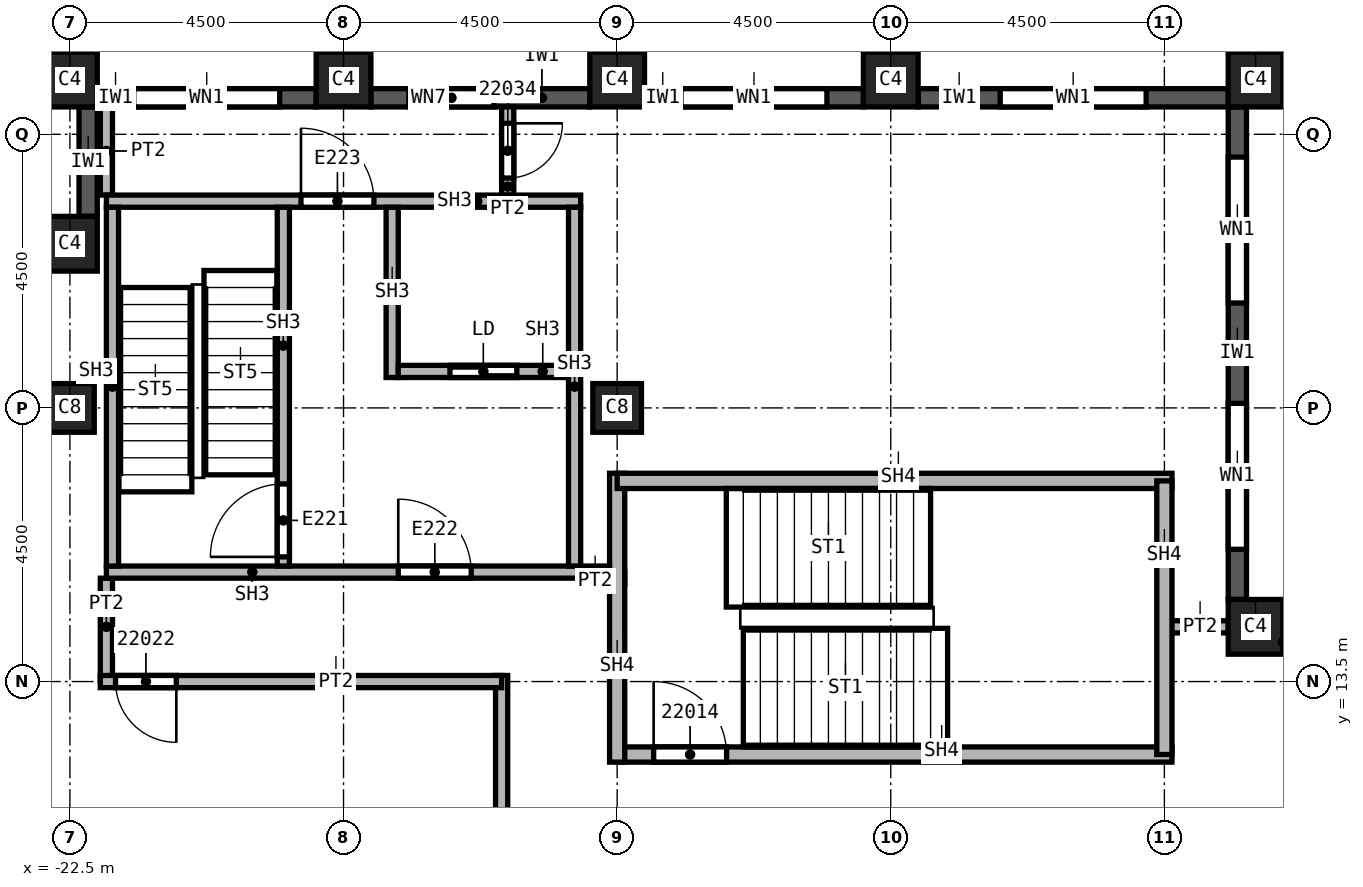
"""IFC4 building model, lengths in metres.
Left out: names, types, materials, properties, quantities, classifications, styles, units other than length and angle.
Written with IfcOpenShell. Run it as: python <this file> out.ifc"""

import sys

from ifc_helpers import new_model, si_unit, direction, frame, frame_2d, origin, origin_2d, place, context, subcontext, project, spatial, rectangle, extrude, element, fill, save


model = new_model("IFC4")
c1 = context("Model", 3, precision=1e-05, world=origin(), true_north=direction((0.0, 1.0)))
c2 = subcontext(c1, "Body", "Model", "MODEL_VIEW")
j1 = project(units=[si_unit("LENGTHUNIT", "METRE"), si_unit("PLANEANGLEUNIT", "RADIAN")], contexts=[c1])
p1 = place(None, origin())
s1 = spatial("IfcSite", under=j1, at=p1, CompositionType="ELEMENT")
p2 = place(p1, origin())
s2 = spatial("IfcBuilding", under=s1, at=p2, CompositionType="ELEMENT")
p3 = place(p2, frame((0.0, 0.0, 312.0)))
s3 = spatial("IfcBuildingStorey", under=s2, at=p3, CompositionType="ELEMENT", Elevation=312.0)
for number, where, z_axis, x_axis in (
    (1, (-13.5, 18.0, 0.0), (0.0, 0.0, 1.0), (1.0, 0.0, 0.0)),
    (2, (-22.5, 18.0, 0.0), (0.0, 0.0, 1.0), (1.0, 0.0, 0.0)),
):
    element("IfcColumn", number, at=place(p3, frame(where, z_axis=z_axis, x_axis=x_axis)), inside=s3, PredefinedType="COLUMN", context=c2, shape_type="SweptSolid", body=[
        extrude(rectangle(XDim=0.8, YDim=0.8, at=origin_2d()), origin(), (0.0, 0.0, 1.0), 3.74),
    ])
for number, where, z_axis, x_axis in (
    (3, (-3.0, 23.4, 0.0), (0.0, 0.0, 1.0), (1.0, 0.0, 0.0)),
    (4, (-9.0, 23.4, 0.0), (0.0, 0.0, 1.0), (1.0, 0.0, 0.0)),
    (5, (-13.5, 23.4, 0.0), (0.0, 0.0, 1.0), (1.0, 0.0, 0.0)),
    (6, (-18.0, 23.4, 0.0), (0.0, 0.0, 1.0), (1.0, 0.0, 0.0)),
    (7, (-22.5, 23.4, 0.0), (0.0, 0.0, 1.0), (1.0, 0.0, 0.0)),
    (8, (-3.0, 14.4, 0.0), (0.0, 0.0, 1.0), (1.0, 0.0, 0.0)),
    (9, (-22.5, 20.7, 0.0), (0.0, 0.0, 1.0), (1.0, 0.0, 0.0)),
):
    element("IfcColumn", number, at=place(p3, frame(where, z_axis=z_axis, x_axis=x_axis)), inside=s3, PredefinedType="COLUMN", context=c2, shape_type="SweptSolid", body=[
        extrude(rectangle(XDim=0.9, YDim=0.9, at=origin_2d()), origin(), (0.0, 0.0, 1.0), 3.74),
    ])
p4 = place(p3, frame((-3.3, 14.85, 0.0), z_axis=(0.0, 0.0, 1.0), x_axis=(0.0, 1.0, 0.0)))
e10 = element("IfcWall", 10, at=p4, inside=s3, PredefinedType="SOLIDWALL", context=c2, shape_type="SweptSolid", body=[
    extrude(rectangle(XDim=8.1, YDim=0.3, at=frame_2d((4.05, 0.0))), origin(), (0.0, 0.0, 1.0), 3.14),
])
p5 = place(p4, frame((0.825, 0.0, 0.8)))
e11 = element("IfcOpeningElement", 11, at=p5, cuts=e10, PredefinedType="OPENING", context=c2, shape_type="SweptSolid", body=[
    extrude(rectangle(XDim=2.4, YDim=1.95, at=frame_2d((1.2, 0.975))), frame((0.0, 0.15, 0.0), z_axis=(0.0, -1.0, 0.0), x_axis=(1.0, 0.0, 0.0)), (0.0, 0.0, 1.0), 0.3),
])
p6 = place(p4, frame((4.875, 0.0, 0.8)))
e12 = element("IfcOpeningElement", 12, at=p6, cuts=e10, PredefinedType="OPENING", context=c2, shape_type="SweptSolid", body=[
    extrude(rectangle(XDim=2.4, YDim=1.95, at=frame_2d((1.2, 0.975))), frame((0.0, 0.15, 0.0), z_axis=(0.0, -1.0, 0.0), x_axis=(1.0, 0.0, 0.0)), (0.0, 0.0, 1.0), 0.3),
])
p7 = place(p3, frame((-3.45, 23.1, 0.0), z_axis=(0.0, 0.0, 1.0), x_axis=(-1.0, 0.0, 0.0)))
e13 = element("IfcWall", 13, at=p7, inside=s3, PredefinedType="SOLIDWALL", context=c2, shape_type="SweptSolid", body=[
    extrude(rectangle(XDim=5.1, YDim=0.3, at=frame_2d((2.55, 0.0))), origin(), (0.0, 0.0, 1.0), 3.14),
])
p8 = place(p7, frame((1.35, 0.0, 0.8)))
e14 = element("IfcOpeningElement", 14, at=p8, cuts=e13, PredefinedType="OPENING", context=c2, shape_type="SweptSolid", body=[
    extrude(rectangle(XDim=2.4, YDim=1.95, at=frame_2d((1.2, 0.975))), frame((0.0, 0.15, 0.0), z_axis=(0.0, -1.0, 0.0), x_axis=(1.0, 0.0, 0.0)), (0.0, 0.0, 1.0), 0.3),
])
p9 = place(p3, frame((-9.45, 23.1, 0.0), z_axis=(0.0, 0.0, 1.0), x_axis=(-1.0, 0.0, 0.0)))
e15 = element("IfcWall", 15, at=p9, inside=s3, PredefinedType="SOLIDWALL", context=c2, shape_type="SweptSolid", body=[
    extrude(rectangle(XDim=3.6, YDim=0.3, at=frame_2d((1.8, 0.0))), origin(), (0.0, 0.0, 1.0), 3.14),
])
p10 = place(p9, frame((0.6, 0.0, 0.8)))
e16 = element("IfcOpeningElement", 16, at=p10, cuts=e15, PredefinedType="OPENING", context=c2, shape_type="SweptSolid", body=[
    extrude(rectangle(XDim=2.4, YDim=1.95, at=frame_2d((1.2, 0.975))), frame((0.0, 0.15, 0.0), z_axis=(0.0, -1.0, 0.0), x_axis=(1.0, 0.0, 0.0)), (0.0, 0.0, 1.0), 0.3),
])
p11 = place(p3, frame((-13.95, 23.1, 0.0), z_axis=(0.0, 0.0, 1.0), x_axis=(-1.0, 0.0, 0.0)))
e17 = element("IfcWall", 17, at=p11, inside=s3, PredefinedType="SOLIDWALL", context=c2, shape_type="SweptSolid", body=[
    extrude(rectangle(XDim=3.6, YDim=0.3, at=frame_2d((1.8, 0.0))), origin(), (0.0, 0.0, 1.0), 3.14),
])
p12 = place(p11, frame((1.575, 0.0, 0.8)))
e18 = element("IfcOpeningElement", 18, at=p12, cuts=e17, PredefinedType="OPENING", context=c2, shape_type="SweptSolid", body=[
    extrude(rectangle(XDim=1.4, YDim=1.95, at=frame_2d((0.7, 0.975))), frame((0.0, 0.15, 0.0), z_axis=(0.0, -1.0, 0.0), x_axis=(1.0, 0.0, 0.0)), (0.0, 0.0, 1.0), 0.3),
])
p13 = place(p3, frame((-18.45, 23.1, 0.0), z_axis=(0.0, 0.0, 1.0), x_axis=(-1.0, 0.0, 0.0)))
e19 = element("IfcWall", 19, at=p13, inside=s3, PredefinedType="SOLIDWALL", context=c2, shape_type="SweptSolid", body=[
    extrude(rectangle(XDim=3.6, YDim=0.3, at=frame_2d((1.8, 0.0))), origin(), (0.0, 0.0, 1.0), 3.14),
])
p14 = place(p13, frame((0.6, 0.0, 0.8)))
e20 = element("IfcOpeningElement", 20, at=p14, cuts=e19, PredefinedType="OPENING", context=c2, shape_type="SweptSolid", body=[
    extrude(rectangle(XDim=2.4, YDim=1.95, at=frame_2d((1.2, 0.975))), frame((0.0, 0.15, 0.0), z_axis=(0.0, -1.0, 0.0), x_axis=(1.0, 0.0, 0.0)), (0.0, 0.0, 1.0), 0.3),
])
p15 = place(p3, frame((-22.2, 22.95, 0.0), z_axis=(0.0, 0.0, 1.0), x_axis=(0.0, -1.0, 0.0)))
e21 = element("IfcWall", 21, at=p15, inside=s3, PredefinedType="SOLIDWALL", context=c2, shape_type="SweptSolid", body=[
    extrude(rectangle(XDim=1.8, YDim=0.3, at=frame_2d((0.9, 0.0))), origin(), (0.0, 0.0, 1.0), 3.14),
])
p16 = place(p3, frame((-21.9, 13.5, 0.0), z_axis=(0.0, 0.0, 1.0), x_axis=(0.0, 1.0, 0.0)))
e22 = element("IfcWall", 22, at=p16, inside=s3, PredefinedType="PARTITIONING", context=c2, shape_type="SweptSolid", body=[
    extrude(rectangle(XDim=1.7, YDim=0.2, at=frame_2d((0.85, 0.0))), origin(), (0.0, 0.0, 1.0), 3.74),
])
p17 = place(p3, frame((-21.9, 21.5, 0.0), z_axis=(0.0, 0.0, 1.0), x_axis=(0.0, 1.0, 0.0)))
e23 = element("IfcWall", 23, at=p17, inside=s3, PredefinedType="PARTITIONING", context=c2, shape_type="SweptSolid", body=[
    extrude(rectangle(XDim=1.45, YDim=0.2, at=frame_2d((0.725, 0.0))), origin(), (0.0, 0.0, 1.0), 3.74),
])
p18 = place(p3, frame((-15.4, -22.95, 0.0), z_axis=(0.0, 0.0, 1.0), x_axis=(0.0, 1.0, 0.0)))
e24 = element("IfcWall", 24, at=p18, inside=s3, PredefinedType="PARTITIONING", context=c2, shape_type="SweptSolid", body=[
    extrude(rectangle(XDim=36.55, YDim=0.2, at=frame_2d((18.275, 0.0))), origin(), (0.0, 0.0, 1.0), 3.74),
])
p19 = place(p18, frame((24.3, 0.0, 0.0)))
e25 = element("IfcOpeningElement", 25, at=p19, cuts=e24, PredefinedType="OPENING", context=c2, shape_type="SweptSolid", body=[
    extrude(rectangle(XDim=1.0, YDim=2.1, at=frame_2d((0.5, 1.05))), frame((0.0, 0.1, 0.0), z_axis=(0.0, -1.0, 0.0), x_axis=(1.0, 0.0, 0.0)), (0.0, 0.0, 1.0), 0.2),
])
p20 = place(p18, frame((9.4, 0.0, 0.0)))
e26 = element("IfcOpeningElement", 26, at=p20, cuts=e24, PredefinedType="OPENING", context=c2, shape_type="SweptSolid", body=[
    extrude(rectangle(XDim=1.0, YDim=2.1, at=frame_2d((0.5, 1.05))), frame((0.0, 0.1, 0.0), z_axis=(0.0, -1.0, 0.0), x_axis=(1.0, 0.0, 0.0)), (0.0, 0.0, 1.0), 0.2),
])
p21 = place(p18, frame((19.05, 0.0, 0.0)))
e27 = element("IfcOpeningElement", 27, at=p21, cuts=e24, PredefinedType="OPENING", context=c2, shape_type="SweptSolid", body=[
    extrude(rectangle(XDim=1.0, YDim=2.1, at=frame_2d((0.5, 1.05))), frame((0.0, 0.1, 0.0), z_axis=(0.0, -1.0, 0.0), x_axis=(1.0, 0.0, 0.0)), (0.0, 0.0, 1.0), 0.2),
])
p22 = place(p3, frame((-15.4, 13.5, 0.0), z_axis=(0.0, 0.0, 1.0), x_axis=(-1.0, 0.0, 0.0)))
e28 = element("IfcWall", 28, at=p22, inside=s3, PredefinedType="PARTITIONING", context=c2, shape_type="SweptSolid", body=[
    extrude(rectangle(XDim=6.6, YDim=0.2, at=frame_2d((3.3, 0.0))), origin(), (0.0, 0.0, 1.0), 3.74),
])
p23 = place(p22, frame((5.35, 0.0, 0.0)))
e29 = element("IfcOpeningElement", 29, at=p23, cuts=e28, PredefinedType="OPENING", context=c2, shape_type="SweptSolid", body=[
    extrude(rectangle(XDim=1.0, YDim=2.1, at=frame_2d((0.5, 1.05))), frame((0.0, 0.1, 0.0), z_axis=(0.0, -1.0, 0.0), x_axis=(1.0, 0.0, 0.0)), (0.0, 0.0, 1.0), 0.2),
])
p24 = place(p3, frame((-15.3, 22.95, 0.0), z_axis=(0.0, 0.0, 1.0), x_axis=(0.0, -1.0, 0.0)))
e30 = element("IfcWall", 30, at=p24, inside=s3, PredefinedType="PARTITIONING", context=c2, shape_type="SweptSolid", body=[
    extrude(rectangle(XDim=1.45, YDim=0.2, at=frame_2d((0.725, 0.0))), origin(), (0.0, 0.0, 1.0), 3.74),
])
p25 = place(p24, frame((0.27, 0.0, 0.0)))
e31 = element("IfcOpeningElement", 31, at=p25, cuts=e30, PredefinedType="OPENING", context=c2, shape_type="SweptSolid", body=[
    extrude(rectangle(XDim=0.9, YDim=2.1, at=frame_2d((0.45, 1.05))), frame((0.0, 0.1, 0.0), z_axis=(0.0, -1.0, 0.0), x_axis=(1.0, 0.0, 0.0)), (0.0, 0.0, 1.0), 0.2),
])
p26 = place(p3, frame((-14.1, 15.2, 0.0), z_axis=(0.0, 0.0, 1.0), x_axis=(1.0, 0.0, 0.0)))
e32 = element("IfcWall", 32, at=p26, inside=s3, PredefinedType="PARTITIONING", context=c2, shape_type="SweptSolid", body=[
    extrude(rectangle(XDim=0.725, YDim=0.2, at=frame_2d((0.363, 0.0))), origin(), (0.0, 0.0, 1.0), 3.74),
])
p27 = place(p3, frame((-4.5, 14.4, 0.0), z_axis=(0.0, 0.0, 1.0), x_axis=(1.0, 0.0, 0.0)))
e33 = element("IfcWall", 33, at=p27, inside=s3, PredefinedType="PARTITIONING", context=c2, shape_type="SweptSolid", body=[
    extrude(rectangle(XDim=1.05, YDim=0.2, at=frame_2d((0.525, 0.0))), origin(), (0.0, 0.0, 1.0), 3.74),
])
p28 = place(p3, frame((-13.5, 12.3, 0.0), z_axis=(0.0, 0.0, 1.0), x_axis=(1.0, 0.0, 0.0)))
e34 = element("IfcWall", 34, at=p28, inside=s3, PredefinedType="SOLIDWALL", context=c2, shape_type="SweptSolid", body=[
    extrude(rectangle(XDim=9.125, YDim=0.25, at=frame_2d((4.562, 0.0))), origin(), (0.0, 0.0, 1.0), 3.74),
])
p29 = place(p28, frame((0.6, 0.0, 0.0)))
e35 = element("IfcOpeningElement", 35, at=p29, cuts=e34, PredefinedType="OPENING", context=c2, shape_type="SweptSolid", body=[
    extrude(rectangle(XDim=1.2, YDim=2.1, at=frame_2d((0.6, 1.05))), frame((0.0, 0.125, 0.0), z_axis=(0.0, -1.0, 0.0), x_axis=(1.0, 0.0, 0.0)), (0.0, 0.0, 1.0), 0.25),
])
p30 = place(p3, frame((-13.5, 12.175, 0.0), z_axis=(0.0, 0.0, 1.0), x_axis=(0.0, 1.0, 0.0)))
e36 = element("IfcWall", 36, at=p30, inside=s3, PredefinedType="SOLIDWALL", context=c2, shape_type="SweptSolid", body=[
    extrude(rectangle(XDim=4.75, YDim=0.25, at=frame_2d((2.375, 0.0))), origin(), (0.0, 0.0, 1.0), 3.74),
])
p31 = place(p3, frame((-13.5, 16.8, 0.0), z_axis=(0.0, 0.0, 1.0), x_axis=(1.0, 0.0, 0.0)))
e37 = element("IfcWall", 37, at=p31, inside=s3, PredefinedType="SOLIDWALL", context=c2, shape_type="SweptSolid", body=[
    extrude(rectangle(XDim=9.125, YDim=0.25, at=frame_2d((4.562, 0.0))), origin(), (0.0, 0.0, 1.0), 3.74),
])
p32 = place(p3, frame((-4.5, 16.8, 0.0), z_axis=(0.0, 0.0, 1.0), x_axis=(0.0, -1.0, 0.0)))
e38 = element("IfcWall", 38, at=p32, inside=s3, PredefinedType="SOLIDWALL", context=c2, shape_type="SweptSolid", body=[
    extrude(rectangle(XDim=4.5, YDim=0.25, at=frame_2d((2.25, 0.0))), origin(), (0.0, 0.0, 1.0), 3.74),
])
p33 = place(p3, frame((-21.9, 15.3, 0.0), z_axis=(0.0, 0.0, 1.0), x_axis=(1.0, 0.0, 0.0)))
e39 = element("IfcWall", 39, at=p33, inside=s3, PredefinedType="SOLIDWALL", context=c2, shape_type="SweptSolid", body=[
    extrude(rectangle(XDim=8.275, YDim=0.2, at=frame_2d((4.137, 0.0))), origin(), (0.0, 0.0, 1.0), 3.74),
])
p34 = place(p33, frame((4.8, 0.0, 0.0)))
e40 = element("IfcOpeningElement", 40, at=p34, cuts=e39, PredefinedType="OPENING", context=c2, shape_type="SweptSolid", body=[
    extrude(rectangle(XDim=1.2, YDim=2.1, at=frame_2d((0.6, 1.05))), frame((0.0, 0.1, 0.0), z_axis=(0.0, -1.0, 0.0), x_axis=(1.0, 0.0, 0.0)), (0.0, 0.0, 1.0), 0.2),
])
p35 = place(p3, frame((-21.9, 21.4, 0.0), z_axis=(0.0, 0.0, 1.0), x_axis=(1.0, 0.0, 0.0)))
e41 = element("IfcWall", 41, at=p35, inside=s3, PredefinedType="SOLIDWALL", context=c2, shape_type="SweptSolid", body=[
    extrude(rectangle(XDim=7.8, YDim=0.2, at=frame_2d((3.9, 0.0))), origin(), (0.0, 0.0, 1.0), 3.74),
])
p36 = place(p35, frame((3.2, 0.0, 0.0)))
e42 = element("IfcOpeningElement", 42, at=p36, cuts=e41, PredefinedType="OPENING", context=c2, shape_type="SweptSolid", body=[
    extrude(rectangle(XDim=1.2, YDim=2.1, at=frame_2d((0.6, 1.05))), frame((0.0, 0.1, 0.0), z_axis=(0.0, -1.0, 0.0), x_axis=(1.0, 0.0, 0.0)), (0.0, 0.0, 1.0), 0.2),
])
for number, where, z_axis, x_axis in (
    (43, (-21.8, 15.4, 0.0), (0.0, 0.0, 1.0), (0.0, 1.0, 0.0)),
    (44, (-14.2, 15.4, 0.0), (0.0, 0.0, 1.0), (0.0, 1.0, 0.0)),
):
    element("IfcWall", number, at=place(p3, frame(where, z_axis=z_axis, x_axis=x_axis)), inside=s3, PredefinedType="SOLIDWALL", context=c2, shape_type="SweptSolid", body=[
        extrude(rectangle(XDim=5.9, YDim=0.2, at=frame_2d((2.95, 0.0))), origin(), (0.0, 0.0, 1.0), 3.74),
    ])
p37 = place(p3, frame((-18.99, 15.4, 0.0), z_axis=(0.0, 0.0, 1.0), x_axis=(0.0, 1.0, 0.0)))
e45 = element("IfcWall", 45, at=p37, inside=s3, PredefinedType="SOLIDWALL", context=c2, shape_type="SweptSolid", body=[
    extrude(rectangle(XDim=5.9, YDim=0.2, at=frame_2d((2.95, 0.0))), origin(), (0.0, 0.0, 1.0), 3.74),
])
p38 = place(p37, frame((0.15, 0.0, 0.0)))
e46 = element("IfcOpeningElement", 46, at=p38, cuts=e45, PredefinedType="OPENING", context=c2, shape_type="SweptSolid", body=[
    extrude(rectangle(XDim=1.2, YDim=2.1, at=frame_2d((0.6, 1.05))), frame((0.0, 0.1, 0.0), z_axis=(0.0, -1.0, 0.0), x_axis=(1.0, 0.0, 0.0)), (0.0, 0.0, 1.0), 0.2),
])
p39 = place(p3, frame((-17.2, 18.5, 0.0), z_axis=(0.0, 0.0, 1.0), x_axis=(0.0, 1.0, 0.0)))
e47 = element("IfcWall", 47, at=p39, inside=s3, PredefinedType="SOLIDWALL", context=c2, shape_type="SweptSolid", body=[
    extrude(rectangle(XDim=2.8, YDim=0.2, at=frame_2d((1.4, 0.0))), origin(), (0.0, 0.0, 1.0), 3.74),
])
p40 = place(p3, frame((-17.1, 18.6, 0.0), z_axis=(0.0, 0.0, 1.0), x_axis=(1.0, 0.0, 0.0)))
e48 = element("IfcWall", 48, at=p40, inside=s3, PredefinedType="SOLIDWALL", context=c2, shape_type="SweptSolid", body=[
    extrude(rectangle(XDim=2.8, YDim=0.2, at=frame_2d((1.4, 0.0))), origin(), (0.0, 0.0, 1.0), 3.74),
])
p41 = place(p40, frame((0.85, 0.0, 0.0)))
e49 = element("IfcOpeningElement", 49, at=p41, cuts=e48, PredefinedType="OPENING", context=c2, shape_type="SweptSolid", body=[
    extrude(rectangle(XDim=1.1, YDim=2.1, at=frame_2d((0.55, 1.05))), frame((0.0, 0.1, 0.0), z_axis=(0.0, -1.0, 0.0), x_axis=(1.0, 0.0, 0.0)), (0.0, 0.0, 1.0), 0.2),
])
p42 = place(p5, origin())
e50 = element("IfcWindow", 50, at=p42, inside=s3, PartitioningType="SINGLE_PANEL", PredefinedType="WINDOW", context=c2, shape_type="SweptSolid", body=[
    extrude(rectangle(XDim=2.4, YDim=1.95, at=frame_2d((1.2, 0.975))), frame((0.0, 0.03, 0.0), z_axis=(0.0, -1.0, 0.0), x_axis=(1.0, 0.0, 0.0)), (0.0, 0.0, 1.0), 0.06),
])
fill(e11, e50)
p43 = place(p6, origin())
e51 = element("IfcWindow", 51, at=p43, inside=s3, PartitioningType="SINGLE_PANEL", PredefinedType="WINDOW", context=c2, shape_type="SweptSolid", body=[
    extrude(rectangle(XDim=2.4, YDim=1.95, at=frame_2d((1.2, 0.975))), frame((0.0, 0.03, 0.0), z_axis=(0.0, -1.0, 0.0), x_axis=(1.0, 0.0, 0.0)), (0.0, 0.0, 1.0), 0.06),
])
fill(e12, e51)
p44 = place(p8, origin())
e52 = element("IfcWindow", 52, at=p44, inside=s3, PartitioningType="SINGLE_PANEL", PredefinedType="WINDOW", context=c2, shape_type="SweptSolid", body=[
    extrude(rectangle(XDim=2.4, YDim=1.95, at=frame_2d((1.2, 0.975))), frame((0.0, 0.03, 0.0), z_axis=(0.0, -1.0, 0.0), x_axis=(1.0, 0.0, 0.0)), (0.0, 0.0, 1.0), 0.06),
])
fill(e14, e52)
p45 = place(p10, origin())
e53 = element("IfcWindow", 53, at=p45, inside=s3, PartitioningType="SINGLE_PANEL", PredefinedType="WINDOW", context=c2, shape_type="SweptSolid", body=[
    extrude(rectangle(XDim=2.4, YDim=1.95, at=frame_2d((1.2, 0.975))), frame((0.0, 0.03, 0.0), z_axis=(0.0, -1.0, 0.0), x_axis=(1.0, 0.0, 0.0)), (0.0, 0.0, 1.0), 0.06),
])
fill(e16, e53)
p46 = place(p14, origin())
e54 = element("IfcWindow", 54, at=p46, inside=s3, PartitioningType="SINGLE_PANEL", PredefinedType="WINDOW", context=c2, shape_type="SweptSolid", body=[
    extrude(rectangle(XDim=2.4, YDim=1.95, at=frame_2d((1.2, 0.975))), frame((0.0, 0.03, 0.0), z_axis=(0.0, -1.0, 0.0), x_axis=(1.0, 0.0, 0.0)), (0.0, 0.0, 1.0), 0.06),
])
fill(e20, e54)
p47 = place(p29, origin())
e55 = element("IfcDoor", 55, at=p47, inside=s3, OperationType="SINGLE_SWING_LEFT", PredefinedType="DOOR", context=c2, shape_type="SweptSolid", body=[
    extrude(rectangle(XDim=1.2, YDim=2.1, at=frame_2d((0.6, 1.05))), frame((0.0, 0.025, 0.0), z_axis=(0.0, -1.0, 0.0), x_axis=(1.0, 0.0, 0.0)), (0.0, 0.0, 1.0), 0.05),
])
fill(e35, e55)
p48 = place(p23, origin())
e56 = element("IfcDoor", 56, at=p48, inside=s3, OperationType="SINGLE_SWING_LEFT", PredefinedType="DOOR", context=c2, shape_type="SweptSolid", body=[
    extrude(rectangle(XDim=1.0, YDim=2.1, at=frame_2d((0.5, 1.05))), frame((0.0, 0.025, 0.0), z_axis=(0.0, -1.0, 0.0), x_axis=(1.0, 0.0, 0.0)), (0.0, 0.0, 1.0), 0.05),
])
fill(e29, e56)
p49 = place(p25, origin())
e57 = element("IfcDoor", 57, at=p49, inside=s3, OperationType="SINGLE_SWING_LEFT", PredefinedType="DOOR", context=c2, shape_type="SweptSolid", body=[
    extrude(rectangle(XDim=0.9, YDim=2.1, at=frame_2d((0.45, 1.05))), frame((0.0, 0.025, 0.0), z_axis=(0.0, -1.0, 0.0), x_axis=(1.0, 0.0, 0.0)), (0.0, 0.0, 1.0), 0.05),
])
fill(e31, e57)
p50 = place(p38, origin())
e58 = element("IfcDoor", 58, at=p50, inside=s3, OperationType="SINGLE_SWING_LEFT", PredefinedType="DOOR", context=c2, shape_type="SweptSolid", body=[
    extrude(rectangle(XDim=1.2, YDim=2.1, at=frame_2d((0.6, 1.05))), frame((0.0, 0.025, 0.0), z_axis=(0.0, -1.0, 0.0), x_axis=(1.0, 0.0, 0.0)), (0.0, 0.0, 1.0), 0.05),
])
fill(e46, e58)
p51 = place(p41, origin())
e59 = element("IfcDoor", 59, at=p51, inside=s3, OperationType="SLIDING_TO_LEFT", PredefinedType="DOOR", context=c2, shape_type="SweptSolid", body=[
    extrude(rectangle(XDim=1.1, YDim=2.1, at=frame_2d((0.55, 1.05))), frame((0.0, 0.025, 0.0), z_axis=(0.0, -1.0, 0.0), x_axis=(1.0, 0.0, 0.0)), (0.0, 0.0, 1.0), 0.05),
])
fill(e49, e59)
p52 = place(p34, origin())
e60 = element("IfcDoor", 60, at=p52, inside=s3, OperationType="SINGLE_SWING_RIGHT", PredefinedType="DOOR", context=c2, shape_type="SweptSolid", body=[
    extrude(rectangle(XDim=1.2, YDim=2.1, at=frame_2d((0.6, 1.05))), frame((0.0, 0.025, 0.0), z_axis=(0.0, -1.0, 0.0), x_axis=(1.0, 0.0, 0.0)), (0.0, 0.0, 1.0), 0.05),
])
fill(e40, e60)
p53 = place(p36, origin())
e61 = element("IfcDoor", 61, at=p53, inside=s3, OperationType="SINGLE_SWING_LEFT", PredefinedType="DOOR", context=c2, shape_type="SweptSolid", body=[
    extrude(rectangle(XDim=1.2, YDim=2.1, at=frame_2d((0.6, 1.05))), frame((0.0, 0.025, 0.0), z_axis=(0.0, -1.0, 0.0), x_axis=(1.0, 0.0, 0.0)), (0.0, 0.0, 1.0), 0.05),
])
fill(e42, e61)
p54 = place(p12, origin())
e62 = element("IfcWindow", 62, at=p54, inside=s3, PartitioningType="SINGLE_PANEL", PredefinedType="WINDOW", context=c2, shape_type="SweptSolid", body=[
    extrude(rectangle(XDim=1.4, YDim=1.95, at=frame_2d((0.7, 0.975))), frame((0.0, 0.03, 0.0), z_axis=(0.0, -1.0, 0.0), x_axis=(1.0, 0.0, 0.0)), (0.0, 0.0, 1.0), 0.06),
])
fill(e18, e62)
save(model, sys.argv[1])
